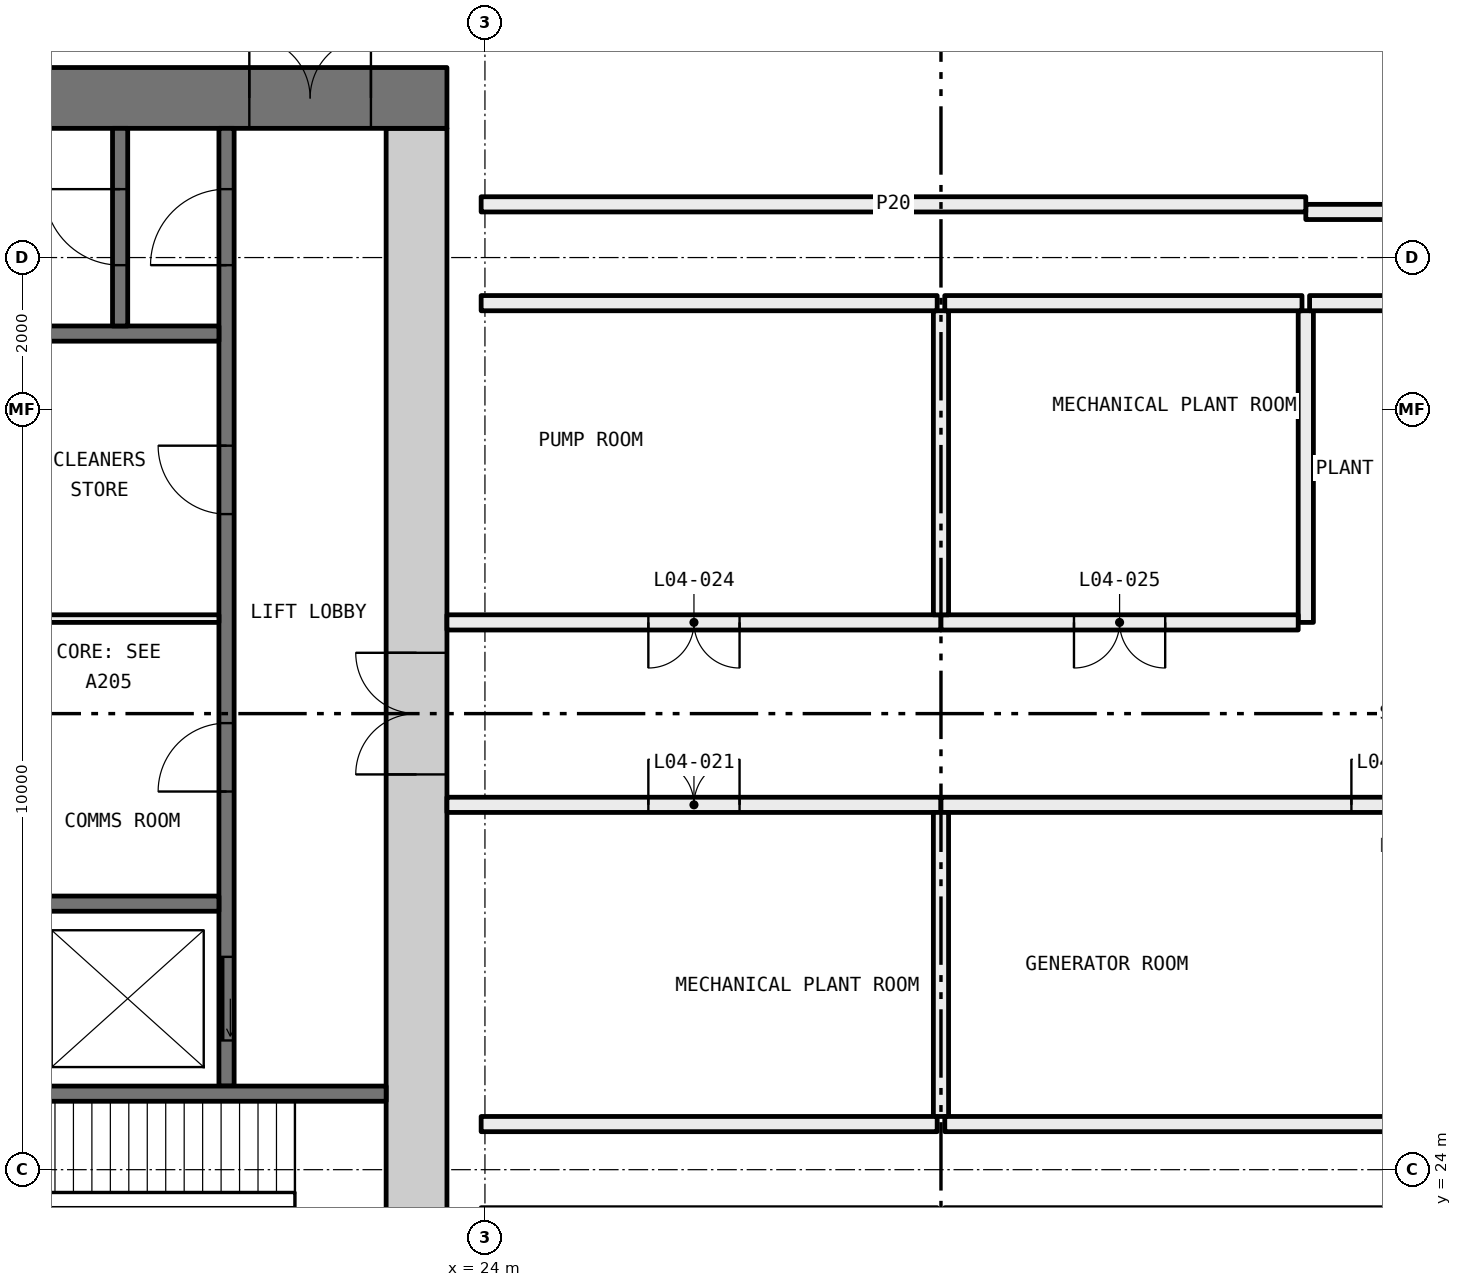
"""IFC4 building model, lengths in metres.
Left out: names, types, materials, properties, quantities, classifications, styles, units other than length and angle.
Written with IfcOpenShell. Run it as: python <this file> out.ifc"""

import sys

from ifc_helpers import new_model, si_unit, direction, frame, frame_2d, origin, place, context, subcontext, project, spatial, rectangle, extrude, element, fill, save


model = new_model("IFC4")
c1 = context("Model", 3, precision=1e-05, world=origin(), true_north=direction((0.0, 1.0)))
c2 = subcontext(c1, "Body", "Model", "MODEL_VIEW")
j1 = project(units=[si_unit("LENGTHUNIT", "METRE"), si_unit("PLANEANGLEUNIT", "RADIAN")], contexts=[c1])
p1 = place(None, origin())
s1 = spatial("IfcSite", under=j1, at=p1, CompositionType="ELEMENT")
p2 = place(p1, origin())
s2 = spatial("IfcBuilding", under=s1, at=p2, CompositionType="ELEMENT")
p3 = place(p2, frame((0.0, 0.0, 24.0)))
s3 = spatial("IfcBuildingStorey", under=s2, at=p3, CompositionType="ELEMENT", Elevation=24.0)
p4 = place(p3, frame((23.5, 28.8, 0.0), z_axis=(0.0, 0.0, 1.0), x_axis=(1.0, 0.0, 0.0)))
e1 = element("IfcWall", 1, at=p4, inside=s3, PredefinedType="PARTITIONING", context=c2, shape_type="SweptSolid", body=[
    extrude(rectangle(XDim=6.5, YDim=0.2, at=frame_2d((3.25, 0.0))), origin(), (0.0, 0.0, 1.0), 5.6),
])
p5 = place(p4, frame((2.65, 0.0, 0.0)))
e2 = element("IfcOpeningElement", 2, at=p5, cuts=e1, PredefinedType="OPENING", context=c2, shape_type="SweptSolid", body=[
    extrude(rectangle(XDim=1.2, YDim=2.1, at=frame_2d((0.6, 1.05))), frame((0.0, 0.11, 0.0), z_axis=(0.0, -1.0, 0.0), x_axis=(1.0, 0.0, 0.0)), (0.0, 0.0, 1.0), 0.22),
])
p6 = place(p3, frame((30.0, 28.8, 0.0), z_axis=(0.0, 0.0, 1.0), x_axis=(1.0, 0.0, 0.0)))
e3 = element("IfcWall", 3, at=p6, inside=s3, PredefinedType="PARTITIONING", context=c2, shape_type="SweptSolid", body=[
    extrude(rectangle(XDim=12.0, YDim=0.2, at=frame_2d((6.0, 0.0))), origin(), (0.0, 0.0, 1.0), 5.6),
])
p7 = place(p6, frame((5.4, 0.0, 0.0)))
e4 = element("IfcOpeningElement", 4, at=p7, cuts=e3, PredefinedType="OPENING", context=c2, shape_type="SweptSolid", body=[
    extrude(rectangle(XDim=1.2, YDim=2.1, at=frame_2d((0.6, 1.05))), frame((0.0, 0.11, 0.0), z_axis=(0.0, -1.0, 0.0), x_axis=(1.0, 0.0, 0.0)), (0.0, 0.0, 1.0), 0.22),
])
p8 = place(p3, frame((30.0, 31.2, 0.0), z_axis=(0.0, 0.0, 1.0), x_axis=(-1.0, 0.0, 0.0)))
e5 = element("IfcWall", 5, at=p8, inside=s3, PredefinedType="PARTITIONING", context=c2, shape_type="SweptSolid", body=[
    extrude(rectangle(XDim=6.5, YDim=0.2, at=frame_2d((3.25, 0.0))), origin(), (0.0, 0.0, 1.0), 5.6),
])
p9 = place(p8, frame((2.65, 0.0, 0.0)))
e6 = element("IfcOpeningElement", 6, at=p9, cuts=e5, PredefinedType="OPENING", context=c2, shape_type="SweptSolid", body=[
    extrude(rectangle(XDim=1.2, YDim=2.1, at=frame_2d((0.6, 1.05))), frame((0.0, 0.11, 0.0), z_axis=(0.0, -1.0, 0.0), x_axis=(1.0, 0.0, 0.0)), (0.0, 0.0, 1.0), 0.22),
])
p10 = place(p3, frame((34.8, 35.3, 0.0), z_axis=(0.0, 0.0, 1.0), x_axis=(0.0, -1.0, 0.0)))
e7 = element("IfcWall", 7, at=p10, inside=s3, PredefinedType="PARTITIONING", context=c2, shape_type="SweptSolid", body=[
    extrude(rectangle(XDim=4.1, YDim=0.2, at=frame_2d((2.05, 0.0))), origin(), (0.0, 0.0, 1.0), 5.6),
])
p11 = place(p3, frame((34.7, 31.2, 0.0), z_axis=(0.0, 0.0, 1.0), x_axis=(-1.0, 0.0, 0.0)))
e8 = element("IfcWall", 8, at=p11, inside=s3, PredefinedType="PARTITIONING", context=c2, shape_type="SweptSolid", body=[
    extrude(rectangle(XDim=4.7, YDim=0.2, at=frame_2d((2.35, 0.0))), origin(), (0.0, 0.0, 1.0), 5.6),
])
p12 = place(p11, frame((1.75, 0.0, 0.0)))
e9 = element("IfcOpeningElement", 9, at=p12, cuts=e8, PredefinedType="OPENING", context=c2, shape_type="SweptSolid", body=[
    extrude(rectangle(XDim=1.2, YDim=2.1, at=frame_2d((0.6, 1.05))), frame((0.0, 0.11, 0.0), z_axis=(0.0, -1.0, 0.0), x_axis=(1.0, 0.0, 0.0)), (0.0, 0.0, 1.0), 0.22),
])
for number, where, z_axis, x_axis in (
    (10, (30.0, 24.7, 0.0), (0.0, 0.0, 1.0), (0.0, 1.0, 0.0)),
    (11, (30.0, 31.3, 0.0), (0.0, 0.0, 1.0), (0.0, 1.0, 0.0)),
):
    element("IfcWall", number, at=place(p3, frame(where, z_axis=z_axis, x_axis=x_axis)), inside=s3, PredefinedType="PARTITIONING", context=c2, shape_type="SweptSolid", body=[
        extrude(rectangle(XDim=4.0, YDim=0.2, at=frame_2d((2.0, 0.0))), origin(), (0.0, 0.0, 1.0), 5.6),
    ])
p13 = place(p3, frame((37.2, 36.6, 0.0), z_axis=(0.0, 0.0, 1.0), x_axis=(-1.0, 0.0, 0.0)))
e12 = element("IfcWall", 12, at=p13, inside=s3, PredefinedType="PARTITIONING", context=c2, shape_type="SweptSolid", body=[
    extrude(rectangle(XDim=2.4, YDim=0.2, at=frame_2d((1.2, 0.0))), origin(), (0.0, 0.0, 1.0), 5.6),
])
p14 = place(p3, frame((34.8, 36.7, 0.0), z_axis=(0.0, 0.0, 1.0), x_axis=(-1.0, 0.0, 0.0)))
e13 = element("IfcWall", 13, at=p14, inside=s3, PredefinedType="PARTITIONING", context=c2, shape_type="SweptSolid", body=[
    extrude(rectangle(XDim=10.85, YDim=0.2, at=frame_2d((5.425, 0.0))), origin(), (0.0, 0.0, 1.0), 5.6),
])
p15 = place(p3, frame((37.15, 35.4, 0.0), z_axis=(0.0, 0.0, 1.0), x_axis=(-1.0, 0.0, 0.0)))
e14 = element("IfcWall", 14, at=p15, inside=s3, PredefinedType="PARTITIONING", context=c2, shape_type="SweptSolid", body=[
    extrude(rectangle(XDim=2.3, YDim=0.2, at=frame_2d((1.15, 0.0))), origin(), (0.0, 0.0, 1.0), 5.6),
])
p16 = place(p3, frame((23.95, 24.6, 0.0), z_axis=(0.0, 0.0, 1.0), x_axis=(1.0, 0.0, 0.0)))
e15 = element("IfcWall", 15, at=p16, inside=s3, PredefinedType="PARTITIONING", context=c2, shape_type="SweptSolid", body=[
    extrude(rectangle(XDim=6.0, YDim=0.2, at=frame_2d((3.0, 0.0))), origin(), (0.0, 0.0, 1.0), 5.6),
])
p17 = place(p3, frame((30.05, 24.6, 0.0), z_axis=(0.0, 0.0, 1.0), x_axis=(1.0, 0.0, 0.0)))
e16 = element("IfcWall", 16, at=p17, inside=s3, PredefinedType="PARTITIONING", context=c2, shape_type="SweptSolid", body=[
    extrude(rectangle(XDim=11.9, YDim=0.2, at=frame_2d((5.95, 0.0))), origin(), (0.0, 0.0, 1.0), 5.6),
])
p18 = place(p3, frame((29.95, 35.4, 0.0), z_axis=(0.0, 0.0, 1.0), x_axis=(-1.0, 0.0, 0.0)))
e17 = element("IfcWall", 17, at=p18, inside=s3, PredefinedType="PARTITIONING", context=c2, shape_type="SweptSolid", body=[
    extrude(rectangle(XDim=6.0, YDim=0.2, at=frame_2d((3.0, 0.0))), origin(), (0.0, 0.0, 1.0), 5.6),
])
p19 = place(p3, frame((34.75, 35.4, 0.0), z_axis=(0.0, 0.0, 1.0), x_axis=(-1.0, 0.0, 0.0)))
e18 = element("IfcWall", 18, at=p19, inside=s3, PredefinedType="PARTITIONING", context=c2, shape_type="SweptSolid", body=[
    extrude(rectangle(XDim=4.7, YDim=0.2, at=frame_2d((2.35, 0.0))), origin(), (0.0, 0.0, 1.0), 5.6),
])
p20 = place(p3, frame((12.5, 38.1, 0.0), z_axis=(0.0, 0.0, 1.0), x_axis=(1.0, 0.0, 0.0)))
e19 = element("IfcWall", 19, at=p20, inside=s3, PredefinedType="SHEAR", context=c2, shape_type="SweptSolid", body=[
    extrude(rectangle(XDim=11.0, YDim=0.8, at=frame_2d((5.5, 0.0))), origin(), (0.0, 0.0, 1.0), 5.6),
])
p21 = place(p20, frame((8.4, 0.0, 0.0)))
e20 = element("IfcOpeningElement", 20, at=p21, cuts=e19, PredefinedType="OPENING", context=c2, shape_type="SweptSolid", body=[
    extrude(rectangle(XDim=1.6, YDim=2.1, at=frame_2d((0.8, 1.05))), frame((0.0, 0.41, 0.0), z_axis=(0.0, -1.0, 0.0), x_axis=(1.0, 0.0, 0.0)), (0.0, 0.0, 1.0), 0.82),
])
p22 = place(p3, frame((23.1, 22.3, 0.0), z_axis=(0.0, 0.0, 1.0), x_axis=(0.0, 1.0, 0.0)))
e21 = element("IfcWall", 21, at=p22, inside=s3, PredefinedType="SHEAR", context=c2, shape_type="SweptSolid", body=[
    extrude(rectangle(XDim=15.4, YDim=0.8, at=frame_2d((7.7, 0.0))), origin(), (0.0, 0.0, 1.0), 5.6),
])
p23 = place(p22, frame((6.9, 0.0, 0.0)))
e22 = element("IfcOpeningElement", 22, at=p23, cuts=e21, PredefinedType="OPENING", context=c2, shape_type="SweptSolid", body=[
    extrude(rectangle(XDim=1.6, YDim=2.1, at=frame_2d((0.8, 1.05))), frame((0.0, 0.41, 0.0), z_axis=(0.0, -1.0, 0.0), x_axis=(1.0, 0.0, 0.0)), (0.0, 0.0, 1.0), 0.82),
])
p24 = place(p3, frame((20.6, 25.1, 0.0), z_axis=(0.0, 0.0, 1.0), x_axis=(0.0, 1.0, 0.0)))
e23 = element("IfcWall", 23, at=p24, inside=s3, PredefinedType="SOLIDWALL", context=c2, shape_type="SweptSolid", body=[
    extrude(rectangle(XDim=12.6, YDim=0.2, at=frame_2d((6.3, 0.0))), origin(), (0.0, 0.0, 1.0), 5.6),
])
p25 = place(p24, frame((0.6, 0.0, 0.0)))
e24 = element("IfcOpeningElement", 24, at=p25, cuts=e23, PredefinedType="OPENING", context=c2, shape_type="SweptSolid", body=[
    extrude(rectangle(XDim=1.1, YDim=2.1, at=frame_2d((0.55, 1.05))), frame((0.0, 0.11, 0.0), z_axis=(0.0, -1.0, 0.0), x_axis=(1.0, 0.0, 0.0)), (0.0, 0.0, 1.0), 0.22),
])
p26 = place(p24, frame((10.8, 0.0, 0.0)))
e25 = element("IfcOpeningElement", 25, at=p26, cuts=e23, PredefinedType="OPENING", context=c2, shape_type="SweptSolid", body=[
    extrude(rectangle(XDim=1.0, YDim=2.1, at=frame_2d((0.5, 1.05))), frame((0.0, 0.11, 0.0), z_axis=(0.0, -1.0, 0.0), x_axis=(1.0, 0.0, 0.0)), (0.0, 0.0, 1.0), 0.22),
])
p27 = place(p24, frame((3.875, 0.0, 0.0)))
e26 = element("IfcOpeningElement", 26, at=p27, cuts=e23, PredefinedType="OPENING", context=c2, shape_type="SweptSolid", body=[
    extrude(rectangle(XDim=0.9, YDim=2.1, at=frame_2d((0.45, 1.05))), frame((0.0, 0.11, 0.0), z_axis=(0.0, -1.0, 0.0), x_axis=(1.0, 0.0, 0.0)), (0.0, 0.0, 1.0), 0.22),
])
p28 = place(p24, frame((7.525, 0.0, 0.0)))
e27 = element("IfcOpeningElement", 27, at=p28, cuts=e23, PredefinedType="OPENING", context=c2, shape_type="SweptSolid", body=[
    extrude(rectangle(XDim=0.9, YDim=2.1, at=frame_2d((0.45, 1.05))), frame((0.0, 0.11, 0.0), z_axis=(0.0, -1.0, 0.0), x_axis=(1.0, 0.0, 0.0)), (0.0, 0.0, 1.0), 0.22),
])
for number, where, z_axis, x_axis in (
    (28, (15.5, 25.0, 0.0), (0.0, 0.0, 1.0), (1.0, 0.0, 0.0)),
    (29, (13.3, 35.0, 0.0), (0.0, 0.0, 1.0), (1.0, 0.0, 0.0)),
):
    element("IfcWall", number, at=place(p3, frame(where, z_axis=z_axis, x_axis=x_axis)), inside=s3, PredefinedType="SOLIDWALL", context=c2, shape_type="SweptSolid", body=[
        extrude(rectangle(XDim=7.2, YDim=0.2, at=frame_2d((3.6, 0.0))), origin(), (0.0, 0.0, 1.0), 5.6),
    ])
p29 = place(p3, frame((19.2, 35.1, 0.0), z_axis=(0.0, 0.0, 1.0), x_axis=(0.0, 1.0, 0.0)))
e30 = element("IfcWall", 30, at=p29, inside=s3, PredefinedType="SOLIDWALL", context=c2, shape_type="SweptSolid", body=[
    extrude(rectangle(XDim=2.6, YDim=0.2, at=frame_2d((1.3, 0.0))), origin(), (0.0, 0.0, 1.0), 5.6),
])
p30 = place(p29, frame((0.8, 0.0, 0.0)))
e31 = element("IfcOpeningElement", 31, at=p30, cuts=e30, PredefinedType="OPENING", context=c2, shape_type="SweptSolid", body=[
    extrude(rectangle(XDim=1.0, YDim=2.1, at=frame_2d((0.5, 1.05))), frame((0.0, 0.11, 0.0), z_axis=(0.0, -1.0, 0.0), x_axis=(1.0, 0.0, 0.0)), (0.0, 0.0, 1.0), 0.22),
])
p31 = place(p3, frame((18.1, 27.5, 0.0), z_axis=(0.0, 0.0, 1.0), x_axis=(1.0, 0.0, 0.0)))
e32 = element("IfcWall", 32, at=p31, inside=s3, PredefinedType="SOLIDWALL", context=c2, shape_type="SweptSolid", body=[
    extrude(rectangle(XDim=2.4, YDim=0.2, at=frame_2d((1.2, 0.0))), origin(), (0.0, 0.0, 1.0), 5.6),
])
p32 = place(p3, frame((18.1, 31.25, 0.0), z_axis=(0.0, 0.0, 1.0), x_axis=(1.0, 0.0, 0.0)))
e33 = element("IfcWall", 33, at=p32, inside=s3, PredefinedType="PARTITIONING", context=c2, shape_type="SweptSolid", body=[
    extrude(rectangle(XDim=2.4, YDim=0.1, at=frame_2d((1.2, 0.0))), origin(), (0.0, 0.0, 1.0), 5.6),
])
p33 = place(p5, origin())
e34 = element("IfcDoor", 34, at=p33, inside=s3, OperationType="DOUBLE_DOOR_SINGLE_SWING", PredefinedType="DOOR", context=c2, shape_type="SweptSolid", body=[
    extrude(rectangle(XDim=1.2, YDim=2.1, at=frame_2d((0.6, 1.05))), frame((0.0, 0.025, 0.0), z_axis=(0.0, -1.0, 0.0), x_axis=(1.0, 0.0, 0.0)), (0.0, 0.0, 1.0), 0.05),
])
fill(e2, e34)
p34 = place(p7, origin())
e35 = element("IfcDoor", 35, at=p34, inside=s3, OperationType="DOUBLE_DOOR_SINGLE_SWING", PredefinedType="DOOR", context=c2, shape_type="SweptSolid", body=[
    extrude(rectangle(XDim=1.2, YDim=2.1, at=frame_2d((0.6, 1.05))), frame((0.0, 0.025, 0.0), z_axis=(0.0, -1.0, 0.0), x_axis=(1.0, 0.0, 0.0)), (0.0, 0.0, 1.0), 0.05),
])
fill(e4, e35)
p35 = place(p9, origin())
e36 = element("IfcDoor", 36, at=p35, inside=s3, OperationType="DOUBLE_DOOR_SINGLE_SWING", PredefinedType="DOOR", context=c2, shape_type="SweptSolid", body=[
    extrude(rectangle(XDim=1.2, YDim=2.1, at=frame_2d((0.6, 1.05))), frame((0.0, 0.025, 0.0), z_axis=(0.0, -1.0, 0.0), x_axis=(1.0, 0.0, 0.0)), (0.0, 0.0, 1.0), 0.05),
])
fill(e6, e36)
p36 = place(p12, origin())
e37 = element("IfcDoor", 37, at=p36, inside=s3, OperationType="DOUBLE_DOOR_SINGLE_SWING", PredefinedType="DOOR", context=c2, shape_type="SweptSolid", body=[
    extrude(rectangle(XDim=1.2, YDim=2.1, at=frame_2d((0.6, 1.05))), frame((0.0, 0.025, 0.0), z_axis=(0.0, -1.0, 0.0), x_axis=(1.0, 0.0, 0.0)), (0.0, 0.0, 1.0), 0.05),
])
fill(e9, e37)
p37 = place(p25, origin())
e38 = element("IfcDoor", 38, at=p37, inside=s3, OperationType="SLIDING_TO_LEFT", PredefinedType="DOOR", context=c2, shape_type="SweptSolid", body=[
    extrude(rectangle(XDim=1.1, YDim=2.1, at=frame_2d((0.55, 1.05))), frame((0.0, 0.025, 0.0), z_axis=(0.0, -1.0, 0.0), x_axis=(1.0, 0.0, 0.0)), (0.0, 0.0, 1.0), 0.05),
])
fill(e24, e38)
p38 = place(p26, origin())
e39 = element("IfcDoor", 39, at=p38, inside=s3, OperationType="SINGLE_SWING_RIGHT", PredefinedType="DOOR", context=c2, shape_type="SweptSolid", body=[
    extrude(rectangle(XDim=1.0, YDim=2.1, at=frame_2d((0.5, 1.05))), frame((0.0, 0.025, 0.0), z_axis=(0.0, -1.0, 0.0), x_axis=(1.0, 0.0, 0.0)), (0.0, 0.0, 1.0), 0.05),
])
fill(e25, e39)
p39 = place(p30, origin())
e40 = element("IfcDoor", 40, at=p39, inside=s3, OperationType="SINGLE_SWING_LEFT", PredefinedType="DOOR", context=c2, shape_type="SweptSolid", body=[
    extrude(rectangle(XDim=1.0, YDim=2.1, at=frame_2d((0.5, 1.05))), frame((0.0, 0.025, 0.0), z_axis=(0.0, -1.0, 0.0), x_axis=(1.0, 0.0, 0.0)), (0.0, 0.0, 1.0), 0.05),
])
fill(e31, e40)
p40 = place(p21, origin())
e41 = element("IfcDoor", 41, at=p40, inside=s3, OperationType="DOUBLE_DOOR_SINGLE_SWING", PredefinedType="DOOR", context=c2, shape_type="SweptSolid", body=[
    extrude(rectangle(XDim=1.6, YDim=2.1, at=frame_2d((0.8, 1.05))), frame((0.0, 0.025, 0.0), z_axis=(0.0, -1.0, 0.0), x_axis=(1.0, 0.0, 0.0)), (0.0, 0.0, 1.0), 0.05),
])
fill(e20, e41)
p41 = place(p23, origin())
e42 = element("IfcDoor", 42, at=p41, inside=s3, OperationType="DOUBLE_DOOR_SINGLE_SWING", PredefinedType="DOOR", context=c2, shape_type="SweptSolid", body=[
    extrude(rectangle(XDim=1.6, YDim=2.1, at=frame_2d((0.8, 1.05))), frame((0.0, 0.025, 0.0), z_axis=(0.0, -1.0, 0.0), x_axis=(1.0, 0.0, 0.0)), (0.0, 0.0, 1.0), 0.05),
])
fill(e22, e42)
p42 = place(p27, origin())
e43 = element("IfcDoor", 43, at=p42, inside=s3, OperationType="SINGLE_SWING_RIGHT", PredefinedType="DOOR", context=c2, shape_type="SweptSolid", body=[
    extrude(rectangle(XDim=0.9, YDim=2.1, at=frame_2d((0.45, 1.05))), frame((0.0, 0.025, 0.0), z_axis=(0.0, -1.0, 0.0), x_axis=(1.0, 0.0, 0.0)), (0.0, 0.0, 1.0), 0.05),
])
fill(e26, e43)
p43 = place(p28, origin())
e44 = element("IfcDoor", 44, at=p43, inside=s3, OperationType="SINGLE_SWING_LEFT", PredefinedType="DOOR", context=c2, shape_type="SweptSolid", body=[
    extrude(rectangle(XDim=0.9, YDim=2.1, at=frame_2d((0.45, 1.05))), frame((0.0, 0.025, 0.0), z_axis=(0.0, -1.0, 0.0), x_axis=(1.0, 0.0, 0.0)), (0.0, 0.0, 1.0), 0.05),
])
fill(e27, e44)
save(model, sys.argv[1])
